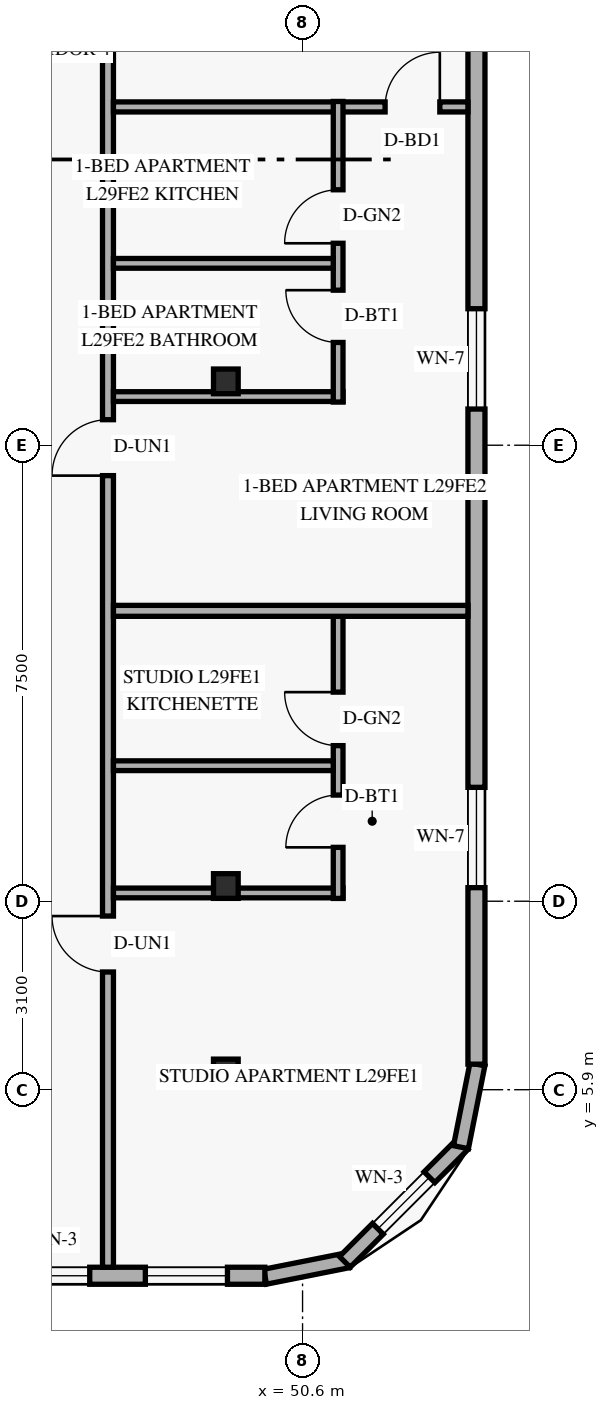
"""IFC4 building model, lengths in metres.
Left out: names, types, materials, properties, quantities, classifications, styles, units other than length and angle.
Written with IfcOpenShell. Run it as: python <this file> out.ifc"""

import sys

from ifc_helpers import new_model, si_unit, direction, frame, frame_2d, origin, origin_2d, place, context, subcontext, project, spatial, rectangle, hollow_rectangle, extrude, element, fill, save


model = new_model("IFC4")
c1 = context("Model", 3, precision=1e-05, world=origin(), true_north=direction((0.0, 1.0)))
c2 = subcontext(c1, "Body", "Model", "MODEL_VIEW")
j1 = project(units=[si_unit("LENGTHUNIT", "METRE"), si_unit("PLANEANGLEUNIT", "RADIAN")], contexts=[c1])
p1 = place(None, origin())
s1 = spatial("IfcSite", under=j1, at=p1, CompositionType="ELEMENT")
p2 = place(p1, origin())
s2 = spatial("IfcBuilding", under=s1, at=p2, CompositionType="ELEMENT")
p3 = place(p2, frame((0.0, 0.0, 113.4)))
s3 = spatial("IfcBuildingStorey", under=s2, at=p3, CompositionType="ELEMENT", Elevation=113.4)
for number, where, z_axis, x_axis in (
    (1, (49.234, 6.2, 0.0), (0.058, 0.0, 0.998), (0.0, 1.0, 0.0)),
    (2, (49.234, 9.25, 0.0), (0.058, 0.0, 0.998), (0.0, 1.0, 0.0)),
    (3, (49.234, 17.55, 0.0), (0.058, 0.0, 0.998), (0.0, 1.0, 0.0)),
):
    element("IfcColumn", number, at=place(p3, frame(where, z_axis=z_axis, x_axis=x_axis)), inside=s3, PredefinedType="COLUMN", context=c2, shape_type="SweptSolid", body=[
        extrude(hollow_rectangle(XDim=0.406, YDim=0.406, WallThickness=0.016, at=origin_2d()), origin(), (0.0, 0.0, 1.0), 3.606),
    ])
p4 = place(p3, frame((49.983, 2.824, 0.0), z_axis=(0.0, 0.0, 1.0), x_axis=(0.980809899341, 0.19496651342, 0.0)))
e4 = element("IfcWall", 4, at=p4, inside=s3, PredefinedType="SOLIDWALL", context=c2, shape_type="SweptSolid", body=[
    extrude(rectangle(XDim=1.389, YDim=0.25, at=frame_2d((0.694, 0.0))), origin(), (0.0, 0.0, 1.0), 3.35),
])
p5 = place(p3, frame((51.295, 3.068, 0.0), z_axis=(0.0, 0.0, 1.0), x_axis=(0.707151344399, 0.707062215165, 0.0)))
e5 = element("IfcWall", 5, at=p5, inside=s3, PredefinedType="SOLIDWALL", context=c2, shape_type="SweptSolid", body=[
    extrude(rectangle(XDim=2.739, YDim=0.25, at=frame_2d((1.37, 0.0))), origin(), (0.0, 0.0, 1.0), 3.35),
])
p6 = place(p5, frame((0.77, 0.0, 0.85)))
e6 = element("IfcOpeningElement", 6, at=p6, cuts=e5, PredefinedType="OPENING", context=c2, shape_type="SweptSolid", body=[
    extrude(rectangle(XDim=1.2, YDim=1.5, at=frame_2d((0.6, 0.75))), frame((0.0, 0.135, 0.0), z_axis=(0.0, -1.0, 0.0), x_axis=(1.0, 0.0, 0.0)), (0.0, 0.0, 1.0), 0.27),
])
p7 = place(p3, frame((53.205, 4.955, 0.0), z_axis=(0.0, 0.0, 1.0), x_axis=(0.195000137217, 0.980803214965, 0.0)))
e7 = element("IfcWall", 7, at=p7, inside=s3, PredefinedType="SOLIDWALL", context=c2, shape_type="SweptSolid", body=[
    extrude(rectangle(XDim=1.388, YDim=0.25, at=frame_2d((0.694, 0.0))), origin(), (0.0, 0.0, 1.0), 3.35),
])
p8 = place(p3, frame((13.42, 2.84, 0.0), z_axis=(0.0, 0.0, 1.0), x_axis=(1.0, 0.0, 0.0)))
e8 = element("IfcWall", 8, at=p8, inside=s3, PredefinedType="SOLIDWALL", context=c2, shape_type="SweptSolid", body=[
    extrude(rectangle(XDim=36.56, YDim=0.28, at=frame_2d((18.28, 0.0))), origin(), (0.0, 0.0, 1.0), 3.35),
])
p9 = place(p8, frame((3.44, 0.0, 0.85)))
e9 = element("IfcOpeningElement", 9, at=p9, cuts=e8, PredefinedType="OPENING", context=c2, shape_type="SweptSolid", body=[
    extrude(rectangle(XDim=1.35, YDim=1.55, at=frame_2d((0.675, 0.775))), frame((0.0, 0.15, 0.0), z_axis=(0.0, -1.0, 0.0), x_axis=(1.0, 0.0, 0.0)), (0.0, 0.0, 1.0), 0.3),
])
p10 = place(p8, frame((10.28, 0.0, 0.85)))
e10 = element("IfcOpeningElement", 10, at=p10, cuts=e8, PredefinedType="OPENING", context=c2, shape_type="SweptSolid", body=[
    extrude(rectangle(XDim=1.35, YDim=1.55, at=frame_2d((0.675, 0.775))), frame((0.0, 0.15, 0.0), z_axis=(0.0, -1.0, 0.0), x_axis=(1.0, 0.0, 0.0)), (0.0, 0.0, 1.0), 0.3),
])
p11 = place(p8, frame((17.165, 0.0, 0.85)))
e11 = element("IfcOpeningElement", 11, at=p11, cuts=e8, PredefinedType="OPENING", context=c2, shape_type="SweptSolid", body=[
    extrude(rectangle(XDim=1.35, YDim=1.55, at=frame_2d((0.675, 0.775))), frame((0.0, 0.15, 0.0), z_axis=(0.0, -1.0, 0.0), x_axis=(1.0, 0.0, 0.0)), (0.0, 0.0, 1.0), 0.3),
])
p12 = place(p8, frame((22.59, 0.0, 0.85)))
e12 = element("IfcOpeningElement", 12, at=p12, cuts=e8, PredefinedType="OPENING", context=c2, shape_type="SweptSolid", body=[
    extrude(rectangle(XDim=1.35, YDim=1.55, at=frame_2d((0.675, 0.775))), frame((0.0, 0.15, 0.0), z_axis=(0.0, -1.0, 0.0), x_axis=(1.0, 0.0, 0.0)), (0.0, 0.0, 1.0), 0.3),
])
p13 = place(p8, frame((27.68, 0.0, 0.85)))
e13 = element("IfcOpeningElement", 13, at=p13, cuts=e8, PredefinedType="OPENING", context=c2, shape_type="SweptSolid", body=[
    extrude(rectangle(XDim=1.35, YDim=1.55, at=frame_2d((0.675, 0.775))), frame((0.0, 0.15, 0.0), z_axis=(0.0, -1.0, 0.0), x_axis=(1.0, 0.0, 0.0)), (0.0, 0.0, 1.0), 0.3),
])
p14 = place(p8, frame((32.48, 0.0, 0.85)))
e14 = element("IfcOpeningElement", 14, at=p14, cuts=e8, PredefinedType="OPENING", context=c2, shape_type="SweptSolid", body=[
    extrude(rectangle(XDim=1.2, YDim=1.5, at=frame_2d((0.6, 0.75))), frame((0.0, 0.15, 0.0), z_axis=(0.0, -1.0, 0.0), x_axis=(1.0, 0.0, 0.0)), (0.0, 0.0, 1.0), 0.3),
])
p15 = place(p8, frame((34.595, 0.0, 0.85)))
e15 = element("IfcOpeningElement", 15, at=p15, cuts=e8, PredefinedType="OPENING", context=c2, shape_type="SweptSolid", body=[
    extrude(rectangle(XDim=1.35, YDim=1.55, at=frame_2d((0.675, 0.775))), frame((0.0, 0.15, 0.0), z_axis=(0.0, -1.0, 0.0), x_axis=(1.0, 0.0, 0.0)), (0.0, 0.0, 1.0), 0.3),
])
p16 = place(p3, frame((53.46, 6.32, 0.0), z_axis=(0.0, 0.0, 1.0), x_axis=(0.0, 1.0, 0.0)))
e16 = element("IfcWall", 16, at=p16, inside=s3, PredefinedType="SOLIDWALL", context=c2, shape_type="SweptSolid", body=[
    extrude(rectangle(XDim=35.36, YDim=0.28, at=frame_2d((17.68, 0.0))), origin(), (0.0, 0.0, 1.0), 3.35),
])
p17 = place(p16, frame((2.903, 0.0, 0.85)))
e17 = element("IfcOpeningElement", 17, at=p17, cuts=e16, PredefinedType="OPENING", context=c2, shape_type="SweptSolid", body=[
    extrude(rectangle(XDim=1.65, YDim=1.6, at=frame_2d((0.825, 0.8))), frame((0.0, 0.15, 0.0), z_axis=(0.0, -1.0, 0.0), x_axis=(1.0, 0.0, 0.0)), (0.0, 0.0, 1.0), 0.3),
])
p18 = place(p16, frame((10.775, 0.0, 0.85)))
e18 = element("IfcOpeningElement", 18, at=p18, cuts=e16, PredefinedType="OPENING", context=c2, shape_type="SweptSolid", body=[
    extrude(rectangle(XDim=1.65, YDim=1.6, at=frame_2d((0.825, 0.8))), frame((0.0, 0.15, 0.0), z_axis=(0.0, -1.0, 0.0), x_axis=(1.0, 0.0, 0.0)), (0.0, 0.0, 1.0), 0.3),
])
p19 = place(p16, frame((16.739, 0.0, 0.85)))
e19 = element("IfcOpeningElement", 19, at=p19, cuts=e16, PredefinedType="OPENING", context=c2, shape_type="SweptSolid", body=[
    extrude(rectangle(XDim=1.65, YDim=1.6, at=frame_2d((0.825, 0.8))), frame((0.0, 0.15, 0.0), z_axis=(0.0, -1.0, 0.0), x_axis=(1.0, 0.0, 0.0)), (0.0, 0.0, 1.0), 0.3),
])
p20 = place(p16, frame((23.671, 0.0, 0.85)))
e20 = element("IfcOpeningElement", 20, at=p20, cuts=e16, PredefinedType="OPENING", context=c2, shape_type="SweptSolid", body=[
    extrude(rectangle(XDim=1.65, YDim=1.6, at=frame_2d((0.825, 0.8))), frame((0.0, 0.15, 0.0), z_axis=(0.0, -1.0, 0.0), x_axis=(1.0, 0.0, 0.0)), (0.0, 0.0, 1.0), 0.3),
])
p21 = place(p16, frame((31.659, 0.0, 0.85)))
e21 = element("IfcOpeningElement", 21, at=p21, cuts=e16, PredefinedType="OPENING", context=c2, shape_type="SweptSolid", body=[
    extrude(rectangle(XDim=1.65, YDim=1.6, at=frame_2d((0.825, 0.8))), frame((0.0, 0.15, 0.0), z_axis=(0.0, -1.0, 0.0), x_axis=(1.0, 0.0, 0.0)), (0.0, 0.0, 1.0), 0.3),
])
p22 = place(p3, frame((47.4, 2.98, 0.0), z_axis=(0.0, 0.0, 1.0), x_axis=(0.0, 1.0, 0.0)))
e22 = element("IfcWall", 22, at=p22, inside=s3, PredefinedType="STANDARD", context=c2, shape_type="SweptSolid", body=[
    extrude(rectangle(XDim=42.04, YDim=0.18, at=frame_2d((21.02, 0.0))), origin(), (0.0, 0.0, 1.0), 2.721),
])
p23 = place(p22, frame((4.856, 0.0, 0.0)))
e23 = element("IfcOpeningElement", 23, at=p23, cuts=e22, PredefinedType="OPENING", context=c2, shape_type="SweptSolid", body=[
    extrude(rectangle(XDim=0.92, YDim=2.15, at=frame_2d((0.46, 1.075))), frame((0.0, 0.1, 0.0), z_axis=(0.0, -1.0, 0.0), x_axis=(1.0, 0.0, 0.0)), (0.0, 0.0, 1.0), 0.2),
])
p24 = place(p22, frame((13.02, 0.0, 0.0)))
e24 = element("IfcOpeningElement", 24, at=p24, cuts=e22, PredefinedType="OPENING", context=c2, shape_type="SweptSolid", body=[
    extrude(rectangle(XDim=0.92, YDim=2.15, at=frame_2d((0.46, 1.075))), frame((0.0, 0.1, 0.0), z_axis=(0.0, -1.0, 0.0), x_axis=(1.0, 0.0, 0.0)), (0.0, 0.0, 1.0), 0.2),
])
p25 = place(p22, frame((27.008, 0.0, 0.0)))
e25 = element("IfcOpeningElement", 25, at=p25, cuts=e22, PredefinedType="OPENING", context=c2, shape_type="SweptSolid", body=[
    extrude(rectangle(XDim=0.92, YDim=2.15, at=frame_2d((0.46, 1.075))), frame((0.0, 0.1, 0.0), z_axis=(0.0, -1.0, 0.0), x_axis=(1.0, 0.0, 0.0)), (0.0, 0.0, 1.0), 0.2),
])
p26 = place(p22, frame((37.948, 0.0, 0.0)))
e26 = element("IfcOpeningElement", 26, at=p26, cuts=e22, PredefinedType="OPENING", context=c2, shape_type="SweptSolid", body=[
    extrude(rectangle(XDim=0.92, YDim=2.15, at=frame_2d((0.46, 1.075))), frame((0.0, 0.1, 0.0), z_axis=(0.0, -1.0, 0.0), x_axis=(1.0, 0.0, 0.0)), (0.0, 0.0, 1.0), 0.2),
])
p27 = place(p3, frame((47.49, 9.136, 0.0), z_axis=(0.0, 0.0, 1.0), x_axis=(1.0, 0.0, 0.0)))
e27 = element("IfcWall", 27, at=p27, inside=s3, PredefinedType="PLUMBINGWALL", context=c2, shape_type="SweptSolid", body=[
    extrude(rectangle(XDim=3.775, YDim=0.16, at=frame_2d((1.888, 0.0))), origin(), (0.0, 0.0, 1.0), 2.721),
])
p28 = place(p3, frame((51.185, 9.046, 0.0), z_axis=(0.0, 0.0, 1.0), x_axis=(0.0, 1.0, 0.0)))
e28 = element("IfcWall", 28, at=p28, inside=s3, PredefinedType="PLUMBINGWALL", context=c2, shape_type="SweptSolid", body=[
    extrude(rectangle(XDim=4.73, YDim=0.16, at=frame_2d((2.365, 0.0))), origin(), (0.0, 0.0, 1.0), 3.35),
])
p29 = place(p28, frame((0.84, 0.0, 0.0)))
e29 = element("IfcOpeningElement", 29, at=p29, cuts=e28, PredefinedType="OPENING", context=c2, shape_type="SweptSolid", body=[
    extrude(rectangle(XDim=0.86, YDim=2.12, at=frame_2d((0.43, 1.06))), frame((0.0, 0.09, 0.0), z_axis=(0.0, -1.0, 0.0), x_axis=(1.0, 0.0, 0.0)), (0.0, 0.0, 1.0), 0.18),
])
p30 = place(p28, frame((2.513, 0.0, 0.0)))
e30 = element("IfcOpeningElement", 30, at=p30, cuts=e28, PredefinedType="OPENING", context=c2, shape_type="SweptSolid", body=[
    extrude(rectangle(XDim=0.88, YDim=2.12, at=frame_2d((0.44, 1.06))), frame((0.0, 0.09, 0.0), z_axis=(0.0, -1.0, 0.0), x_axis=(1.0, 0.0, 0.0)), (0.0, 0.0, 1.0), 0.18),
])
p31 = place(p3, frame((47.49, 11.229, 0.0), z_axis=(0.0, 0.0, 1.0), x_axis=(1.0, 0.0, 0.0)))
e31 = element("IfcWall", 31, at=p31, inside=s3, PredefinedType="PLUMBINGWALL", context=c2, shape_type="SweptSolid", body=[
    extrude(rectangle(XDim=3.615, YDim=0.16, at=frame_2d((1.808, 0.0))), origin(), (0.0, 0.0, 1.0), 2.799),
])
p32 = place(p3, frame((47.49, 13.776, 0.0), z_axis=(0.0, 0.0, 1.0), x_axis=(1.0, 0.0, 0.0)))
e32 = element("IfcWall", 32, at=p32, inside=s3, PredefinedType="PARTITIONING", context=c2, shape_type="SweptSolid", body=[
    extrude(rectangle(XDim=5.83, YDim=0.18, at=frame_2d((2.915, 0.0))), origin(), (0.0, 0.0, 1.0), 2.799),
])
p33 = place(p3, frame((47.49, 22.064, 0.0), z_axis=(0.0, 0.0, 1.0), x_axis=(1.0, 0.0, 0.0)))
e33 = element("IfcWall", 33, at=p33, inside=s3, PredefinedType="PARTITIONING", context=c2, shape_type="SweptSolid", body=[
    extrude(rectangle(XDim=5.83, YDim=0.165, at=frame_2d((2.915, 0.0))), origin(), (0.0, 0.0, 1.0), 2.799),
])
p34 = place(p33, frame((4.468, 0.0, 0.0)))
e34 = element("IfcOpeningElement", 34, at=p34, cuts=e33, PredefinedType="OPENING", context=c2, shape_type="SweptSolid", body=[
    extrude(rectangle(XDim=0.9, YDim=2.14, at=frame_2d((0.45, 1.07))), frame((0.0, 0.093, 0.0), z_axis=(0.0, -1.0, 0.0), x_axis=(1.0, 0.0, 0.0)), (0.0, 0.0, 1.0), 0.185),
])
p35 = place(p3, frame((47.49, 17.3, 0.0), z_axis=(0.0, 0.0, 1.0), x_axis=(1.0, 0.0, 0.0)))
e35 = element("IfcWall", 35, at=p35, inside=s3, PredefinedType="PLUMBINGWALL", context=c2, shape_type="SweptSolid", body=[
    extrude(rectangle(XDim=3.775, YDim=0.16, at=frame_2d((1.888, 0.0))), origin(), (0.0, 0.0, 1.0), 2.721),
])
p36 = place(p3, frame((51.185, 17.21, 0.0), z_axis=(0.0, 0.0, 1.0), x_axis=(0.0, 1.0, 0.0)))
e36 = element("IfcWall", 36, at=p36, inside=s3, PredefinedType="PLUMBINGWALL", context=c2, shape_type="SweptSolid", body=[
    extrude(rectangle(XDim=4.944, YDim=0.16, at=frame_2d((2.472, 0.0))), origin(), (0.0, 0.0, 1.0), 3.35),
])
p37 = place(p36, frame((0.98, 0.0, 0.0)))
e37 = element("IfcOpeningElement", 37, at=p37, cuts=e36, PredefinedType="OPENING", context=c2, shape_type="SweptSolid", body=[
    extrude(rectangle(XDim=0.86, YDim=2.12, at=frame_2d((0.43, 1.06))), frame((0.0, 0.09, 0.0), z_axis=(0.0, -1.0, 0.0), x_axis=(1.0, 0.0, 0.0)), (0.0, 0.0, 1.0), 0.18),
])
p38 = place(p36, frame((2.611, 0.0, 0.0)))
e38 = element("IfcOpeningElement", 38, at=p38, cuts=e36, PredefinedType="OPENING", context=c2, shape_type="SweptSolid", body=[
    extrude(rectangle(XDim=0.88, YDim=2.12, at=frame_2d((0.44, 1.06))), frame((0.0, 0.09, 0.0), z_axis=(0.0, -1.0, 0.0), x_axis=(1.0, 0.0, 0.0)), (0.0, 0.0, 1.0), 0.18),
])
p39 = place(p3, frame((47.49, 19.491, 0.0), z_axis=(0.0, 0.0, 1.0), x_axis=(1.0, 0.0, 0.0)))
e39 = element("IfcWall", 39, at=p39, inside=s3, PredefinedType="PLUMBINGWALL", context=c2, shape_type="SweptSolid", body=[
    extrude(rectangle(XDim=3.615, YDim=0.16, at=frame_2d((1.808, 0.0))), origin(), (0.0, 0.0, 1.0), 2.799),
])
p40 = place(p6, origin())
e40 = element("IfcWindow", 40, at=p40, inside=s3, PartitioningType="SINGLE_PANEL", PredefinedType="WINDOW", context=c2, shape_type="SweptSolid", body=[
    extrude(rectangle(XDim=1.2, YDim=1.5, at=frame_2d((0.6, 0.75))), frame((0.0, 0.03, 0.0), z_axis=(0.0, -1.0, 0.0), x_axis=(1.0, 0.0, 0.0)), (0.0, 0.0, 1.0), 0.06),
])
fill(e6, e40)
p41 = place(p14, origin())
e41 = element("IfcWindow", 41, at=p41, inside=s3, PartitioningType="SINGLE_PANEL", PredefinedType="WINDOW", context=c2, shape_type="SweptSolid", body=[
    extrude(rectangle(XDim=1.2, YDim=1.5, at=frame_2d((0.6, 0.75))), frame((0.0, 0.03, 0.0), z_axis=(0.0, -1.0, 0.0), x_axis=(1.0, 0.0, 0.0)), (0.0, 0.0, 1.0), 0.06),
])
fill(e14, e41)
p42 = place(p15, origin())
e42 = element("IfcWindow", 42, at=p42, inside=s3, PartitioningType="SINGLE_PANEL", PredefinedType="WINDOW", context=c2, shape_type="SweptSolid", body=[
    extrude(rectangle(XDim=1.35, YDim=1.55, at=frame_2d((0.675, 0.775))), frame((0.0, 0.03, 0.0), z_axis=(0.0, -1.0, 0.0), x_axis=(1.0, 0.0, 0.0)), (0.0, 0.0, 1.0), 0.06),
])
fill(e15, e42)
p43 = place(p17, origin())
e43 = element("IfcWindow", 43, at=p43, inside=s3, PartitioningType="SINGLE_PANEL", PredefinedType="WINDOW", context=c2, shape_type="SweptSolid", body=[
    extrude(rectangle(XDim=1.65, YDim=1.6, at=frame_2d((0.825, 0.8))), frame((0.0, 0.03, 0.0), z_axis=(0.0, -1.0, 0.0), x_axis=(1.0, 0.0, 0.0)), (0.0, 0.0, 1.0), 0.06),
])
fill(e17, e43)
p44 = place(p18, origin())
e44 = element("IfcWindow", 44, at=p44, inside=s3, PartitioningType="SINGLE_PANEL", PredefinedType="WINDOW", context=c2, shape_type="SweptSolid", body=[
    extrude(rectangle(XDim=1.65, YDim=1.6, at=frame_2d((0.825, 0.8))), frame((0.0, 0.03, 0.0), z_axis=(0.0, -1.0, 0.0), x_axis=(1.0, 0.0, 0.0)), (0.0, 0.0, 1.0), 0.06),
])
fill(e18, e44)
p45 = place(p23, origin())
e45 = element("IfcDoor", 45, at=p45, inside=s3, OperationType="SINGLE_SWING_RIGHT", PredefinedType="DOOR", context=c2, shape_type="SweptSolid", body=[
    extrude(rectangle(XDim=0.92, YDim=2.15, at=frame_2d((0.46, 1.075))), frame((0.0, 0.025, 0.0), z_axis=(0.0, -1.0, 0.0), x_axis=(1.0, 0.0, 0.0)), (0.0, 0.0, 1.0), 0.05),
])
fill(e23, e45)
p46 = place(p29, origin())
e46 = element("IfcDoor", 46, at=p46, inside=s3, OperationType="SINGLE_SWING_LEFT", PredefinedType="DOOR", context=c2, shape_type="SweptSolid", body=[
    extrude(rectangle(XDim=0.86, YDim=2.12, at=frame_2d((0.43, 1.06))), frame((0.0, 0.025, 0.0), z_axis=(0.0, -1.0, 0.0), x_axis=(1.0, 0.0, 0.0)), (0.0, 0.0, 1.0), 0.05),
])
fill(e29, e46)
p47 = place(p30, origin())
e47 = element("IfcDoor", 47, at=p47, inside=s3, OperationType="SINGLE_SWING_RIGHT", PredefinedType="DOOR", context=c2, shape_type="SweptSolid", body=[
    extrude(rectangle(XDim=0.88, YDim=2.12, at=frame_2d((0.44, 1.06))), frame((0.0, 0.025, 0.0), z_axis=(0.0, -1.0, 0.0), x_axis=(1.0, 0.0, 0.0)), (0.0, 0.0, 1.0), 0.05),
])
fill(e30, e47)
p48 = place(p24, origin())
e48 = element("IfcDoor", 48, at=p48, inside=s3, OperationType="SINGLE_SWING_LEFT", PredefinedType="DOOR", context=c2, shape_type="SweptSolid", body=[
    extrude(rectangle(XDim=0.92, YDim=2.15, at=frame_2d((0.46, 1.075))), frame((0.0, 0.025, 0.0), z_axis=(0.0, -1.0, 0.0), x_axis=(1.0, 0.0, 0.0)), (0.0, 0.0, 1.0), 0.05),
])
fill(e24, e48)
p49 = place(p37, origin())
e49 = element("IfcDoor", 49, at=p49, inside=s3, OperationType="SINGLE_SWING_RIGHT", PredefinedType="DOOR", context=c2, shape_type="SweptSolid", body=[
    extrude(rectangle(XDim=0.86, YDim=2.12, at=frame_2d((0.43, 1.06))), frame((0.0, 0.025, 0.0), z_axis=(0.0, -1.0, 0.0), x_axis=(1.0, 0.0, 0.0)), (0.0, 0.0, 1.0), 0.05),
])
fill(e37, e49)
p50 = place(p38, origin())
e50 = element("IfcDoor", 50, at=p50, inside=s3, OperationType="SINGLE_SWING_LEFT", PredefinedType="DOOR", context=c2, shape_type="SweptSolid", body=[
    extrude(rectangle(XDim=0.88, YDim=2.12, at=frame_2d((0.44, 1.06))), frame((0.0, 0.025, 0.0), z_axis=(0.0, -1.0, 0.0), x_axis=(1.0, 0.0, 0.0)), (0.0, 0.0, 1.0), 0.05),
])
fill(e38, e50)
p51 = place(p34, origin())
e51 = element("IfcDoor", 51, at=p51, inside=s3, OperationType="SINGLE_SWING_RIGHT", PredefinedType="DOOR", context=c2, shape_type="SweptSolid", body=[
    extrude(rectangle(XDim=0.9, YDim=2.14, at=frame_2d((0.45, 1.07))), frame((0.0, 0.025, 0.0), z_axis=(0.0, -1.0, 0.0), x_axis=(1.0, 0.0, 0.0)), (0.0, 0.0, 1.0), 0.05),
])
fill(e34, e51)
save(model, sys.argv[1])
